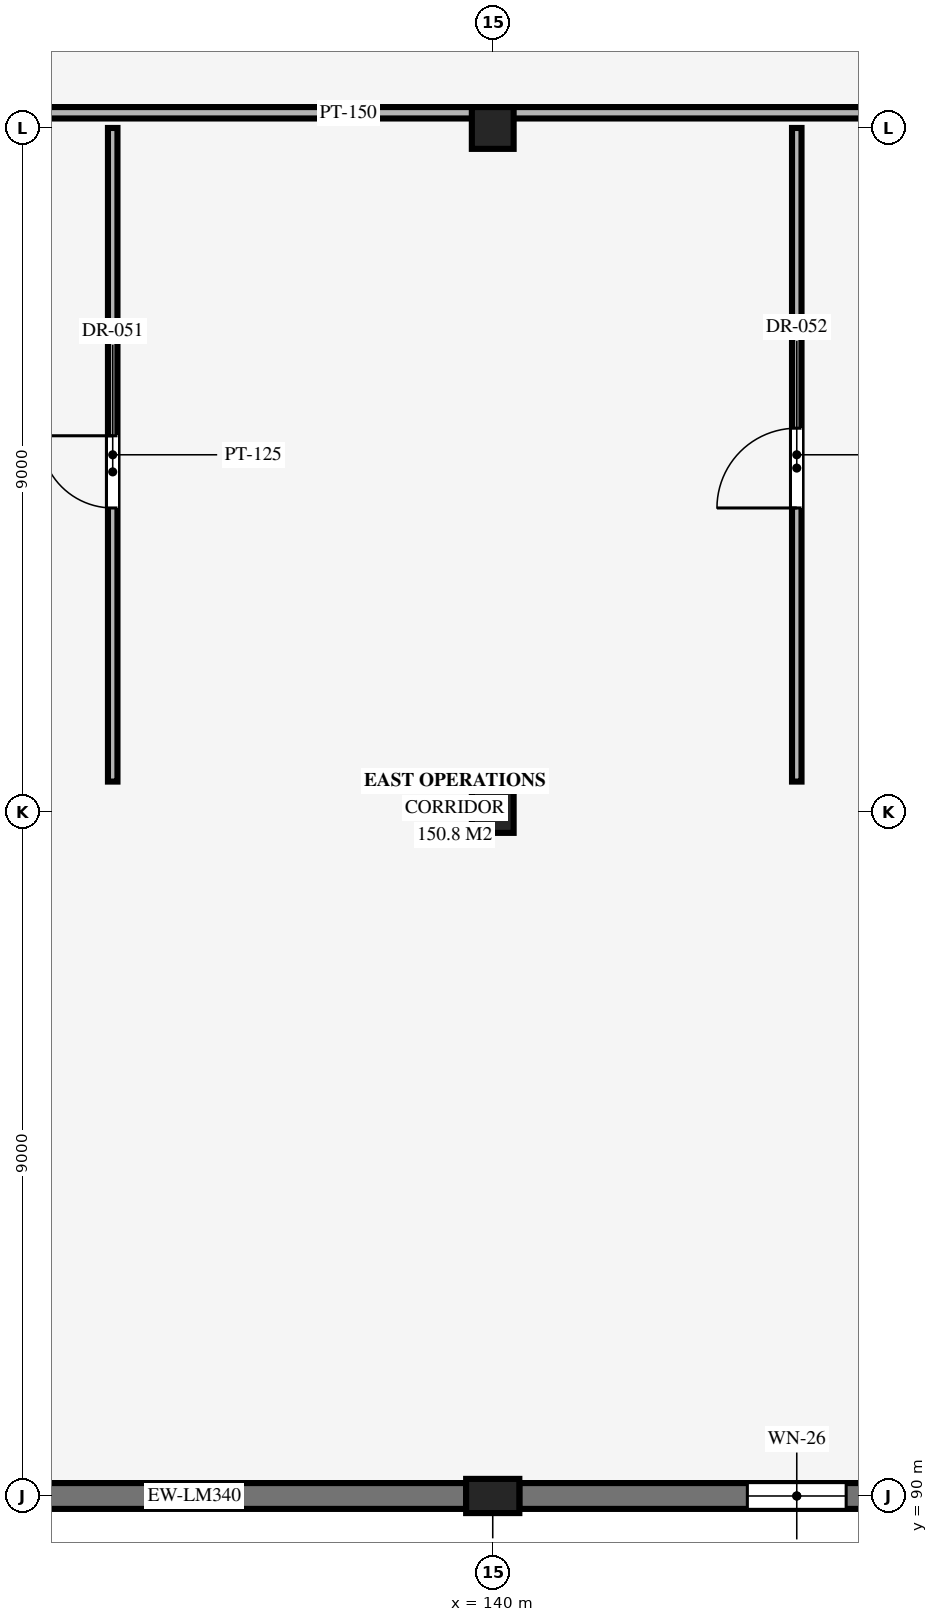
"""IFC4 building model, lengths in metres.
Left out: names, types, materials, properties, quantities, classifications, styles, units other than length and angle.
Written with IfcOpenShell. Run it as: python <this file> out.ifc"""

import sys

from ifc_helpers import new_model, si_unit, direction, frame, frame_2d, origin, origin_2d, place, context, subcontext, project, spatial, rectangle, extrude, element, fill, save


model = new_model("IFC4")
c1 = context("Model", 3, precision=1e-05, world=origin(), true_north=direction((0.0, 1.0)))
c2 = subcontext(c1, "Body", "Model", "MODEL_VIEW")
j1 = project(units=[si_unit("LENGTHUNIT", "METRE"), si_unit("PLANEANGLEUNIT", "RADIAN")], contexts=[c1])
p1 = place(None, origin())
s1 = spatial("IfcSite", under=j1, at=p1, CompositionType="ELEMENT")
p2 = place(p1, origin())
s2 = spatial("IfcBuilding", under=s1, at=p2, CompositionType="ELEMENT")
p3 = place(p2, frame((0.0, 0.0, 19.5)))
s3 = spatial("IfcBuildingStorey", under=s2, at=p3, CompositionType="ELEMENT", Elevation=19.5)
p4 = place(p3, frame((140.0, 90.0, 0.0), z_axis=(0.0, 0.0, 1.0), x_axis=(0.0, 1.0, 0.0)))
e1 = element("IfcColumn", 1, at=p4, inside=s3, PredefinedType="PILASTER", context=c2, shape_type="SweptSolid", body=[
    extrude(rectangle(XDim=0.45, YDim=0.7, at=origin_2d()), origin(), (0.0, 0.0, 1.0), 4.04),
])
for number, where, z_axis, x_axis in (
    (2, (140.0, 99.0, 0.0), (0.0, 0.0, 1.0), (1.0, 0.0, 0.0)),
    (3, (140.0, 108.0, 0.0), (0.0, 0.0, 1.0), (1.0, 0.0, 0.0)),
):
    element("IfcColumn", number, at=place(p3, frame(where, z_axis=z_axis, x_axis=x_axis)), inside=s3, PredefinedType="COLUMN", context=c2, shape_type="SweptSolid", body=[
        extrude(rectangle(XDim=0.55, YDim=0.55, at=origin_2d()), origin(), (0.0, 0.0, 1.0), 4.04),
    ])
p5 = place(p3, frame((139.65, 90.0, 0.0), z_axis=(0.0, 0.0, 1.0), x_axis=(-1.0, 0.0, 0.0)))
e4 = element("IfcWall", 4, at=p5, inside=s3, PredefinedType="SOLIDWALL", context=c2, shape_type="SweptSolid", body=[
    extrude(rectangle(XDim=7.15, YDim=0.34, at=frame_2d((3.575, 0.0))), origin(), (0.0, 0.0, 1.0), 3.94),
])
p6 = place(p3, frame((147.65, 90.0, 0.0), z_axis=(0.0, 0.0, 1.0), x_axis=(-1.0, 0.0, 0.0)))
e5 = element("IfcWall", 5, at=p6, inside=s3, PredefinedType="SOLIDWALL", context=c2, shape_type="SweptSolid", body=[
    extrude(rectangle(XDim=7.3, YDim=0.34, at=frame_2d((3.65, 0.0))), origin(), (0.0, 0.0, 1.0), 3.94),
])
p7 = place(p6, frame((3.0, 0.0, 1.0)))
e6 = element("IfcOpeningElement", 6, at=p7, cuts=e5, PredefinedType="OPENING", context=c2, shape_type="SweptSolid", body=[
    extrude(rectangle(XDim=1.3, YDim=1.9, at=frame_2d((0.65, 0.95))), frame((0.0, 0.18, 0.0), z_axis=(0.0, -1.0, 0.0), x_axis=(1.0, 0.0, 0.0)), (0.0, 0.0, 1.0), 0.36),
])
p8 = place(p3, frame((120.6, 108.2, 0.0), z_axis=(0.0, 0.0, 1.0), x_axis=(1.0, 0.0, 0.0)))
e7 = element("IfcWall", 7, at=p8, inside=s3, PredefinedType="PARTITIONING", context=c2, shape_type="SweptSolid", body=[
    extrude(rectangle(XDim=35.0, YDim=0.15, at=frame_2d((17.5, 0.0))), origin(), (0.0, 0.0, 1.0), 3.2),
])
p9 = place(p8, frame((8.0, 0.0, 0.0)))
e8 = element("IfcOpeningElement", 8, at=p9, cuts=e7, PredefinedType="OPENING", context=c2, shape_type="SweptSolid", body=[
    extrude(rectangle(XDim=1.4, YDim=2.15, at=frame_2d((0.7, 1.075))), frame((0.0, 0.085, 0.0), z_axis=(0.0, -1.0, 0.0), x_axis=(1.0, 0.0, 0.0)), (0.0, 0.0, 1.0), 0.17),
])
p10 = place(p8, frame((29.0, 0.0, 0.0)))
e9 = element("IfcOpeningElement", 9, at=p10, cuts=e7, PredefinedType="OPENING", context=c2, shape_type="SweptSolid", body=[
    extrude(rectangle(XDim=1.0, YDim=2.15, at=frame_2d((0.5, 1.075))), frame((0.0, 0.085, 0.0), z_axis=(0.0, -1.0, 0.0), x_axis=(1.0, 0.0, 0.0)), (0.0, 0.0, 1.0), 0.17),
])
p11 = place(p3, frame((135.0, 99.4, 0.0), z_axis=(0.0, 0.0, 1.0), x_axis=(0.0, 1.0, 0.0)))
e10 = element("IfcWall", 10, at=p11, inside=s3, PredefinedType="PARTITIONING", context=c2, shape_type="SweptSolid", body=[
    extrude(rectangle(XDim=8.6, YDim=0.125, at=frame_2d((4.3, 0.0))), origin(), (0.0, 0.0, 1.0), 3.2),
])
p12 = place(p11, frame((3.6, 0.0, 0.0)))
e11 = element("IfcOpeningElement", 11, at=p12, cuts=e10, PredefinedType="OPENING", context=c2, shape_type="SweptSolid", body=[
    extrude(rectangle(XDim=0.95, YDim=2.1, at=frame_2d((0.475, 1.05))), frame((0.0, 0.073, 0.0), z_axis=(0.0, -1.0, 0.0), x_axis=(1.0, 0.0, 0.0)), (0.0, 0.0, 1.0), 0.145),
])
p13 = place(p3, frame((144.0, 99.4, 0.0), z_axis=(0.0, 0.0, 1.0), x_axis=(0.0, 1.0, 0.0)))
e12 = element("IfcWall", 12, at=p13, inside=s3, PredefinedType="PARTITIONING", context=c2, shape_type="SweptSolid", body=[
    extrude(rectangle(XDim=8.6, YDim=0.125, at=frame_2d((4.3, 0.0))), origin(), (0.0, 0.0, 1.0), 3.2),
])
p14 = place(p13, frame((3.6, 0.0, 0.0)))
e13 = element("IfcOpeningElement", 13, at=p14, cuts=e12, PredefinedType="OPENING", context=c2, shape_type="SweptSolid", body=[
    extrude(rectangle(XDim=1.05, YDim=2.15, at=frame_2d((0.525, 1.075))), frame((0.0, 0.073, 0.0), z_axis=(0.0, -1.0, 0.0), x_axis=(1.0, 0.0, 0.0)), (0.0, 0.0, 1.0), 0.145),
])
p15 = place(p7, origin())
e14 = element("IfcWindow", 14, at=p15, inside=s3, PartitioningType="SINGLE_PANEL", PredefinedType="WINDOW", context=c2, shape_type="SweptSolid", body=[
    extrude(rectangle(XDim=1.3, YDim=1.9, at=frame_2d((0.65, 0.95))), frame((0.0, 0.03, 0.0), z_axis=(0.0, -1.0, 0.0), x_axis=(1.0, 0.0, 0.0)), (0.0, 0.0, 1.0), 0.06),
])
fill(e6, e14)
p16 = place(p12, origin())
e15 = element("IfcDoor", 15, at=p16, inside=s3, OperationType="SINGLE_SWING_RIGHT", PredefinedType="DOOR", context=c2, shape_type="SweptSolid", body=[
    extrude(rectangle(XDim=0.95, YDim=2.1, at=frame_2d((0.475, 1.05))), frame((0.0, 0.025, 0.0), z_axis=(0.0, -1.0, 0.0), x_axis=(1.0, 0.0, 0.0)), (0.0, 0.0, 1.0), 0.05),
])
fill(e11, e15)
p17 = place(p14, origin())
e16 = element("IfcDoor", 16, at=p17, inside=s3, OperationType="SINGLE_SWING_LEFT", PredefinedType="DOOR", context=c2, shape_type="SweptSolid", body=[
    extrude(rectangle(XDim=1.05, YDim=2.15, at=frame_2d((0.525, 1.075))), frame((0.0, 0.025, 0.0), z_axis=(0.0, -1.0, 0.0), x_axis=(1.0, 0.0, 0.0)), (0.0, 0.0, 1.0), 0.05),
])
fill(e13, e16)
save(model, sys.argv[1])
